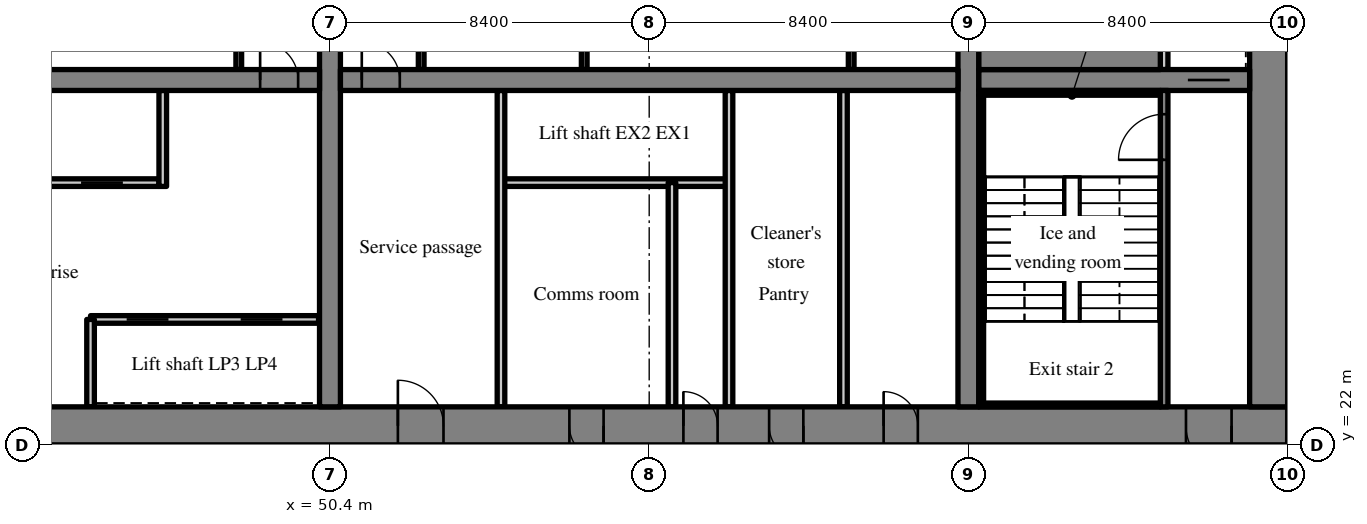
"""IFC4 building model, lengths in metres.
Left out: names, types, materials, properties, quantities, classifications, styles, units other than length and angle.
Written with IfcOpenShell. Run it as: python <this file> out.ifc"""

import sys

from ifc_helpers import new_model, si_unit, direction, frame, frame_2d, origin, place, context, subcontext, project, spatial, rectangle, extrude, source, transform, mapped, element, fill, save


model = new_model("IFC4")
c1 = context("Model", 3, precision=1e-05, world=origin(), true_north=direction((0.0, 1.0)))
c2 = subcontext(c1, "Body", "Model", "MODEL_VIEW")
j1 = project(units=[si_unit("LENGTHUNIT", "METRE"), si_unit("PLANEANGLEUNIT", "RADIAN")], contexts=[c1])
p1 = place(None, origin())
s1 = spatial("IfcSite", under=j1, at=p1, CompositionType="ELEMENT")
p2 = place(p1, origin())
s2 = spatial("IfcBuilding", under=s1, at=p2, CompositionType="ELEMENT")
p3 = place(p2, frame((0.0, 0.0, 62.0)))
s3 = spatial("IfcBuildingStorey", under=s2, at=p3, CompositionType="ELEMENT", Elevation=62.0)
m1 = source(origin(), c2, "Body", "SweptSolid", [
    extrude(rectangle(XDim=50.4, YDim=1.0, at=frame_2d((25.2, 0.0))), origin(), (0.0, 0.0, 1.0), 3.52),
])
p4 = place(p3, frame((25.2, 22.5, 0.0), z_axis=(0.0, 0.0, 1.0), x_axis=(1.0, 0.0, 0.0)))
e1 = element("IfcWall", 1, at=p4, inside=s3, PredefinedType="SHEAR", context=c2, shape_type="MappedRepresentation", body=[
    mapped(m1, transform((0.0, 0.0, 0.0), scale=1.0)),
])
m2 = source(origin(), c2, "Body", "SweptSolid", [
    extrude(rectangle(XDim=1.8, YDim=2.1, at=frame_2d((0.9, 1.05))), frame((0.0, 0.51, 0.0), z_axis=(0.0, -1.0, 0.0), x_axis=(1.0, 0.0, 0.0)), (0.0, 0.0, 1.0), 1.02),
])
p5 = place(p4, frame((15.9, 0.0, 0.0)))
e2 = element("IfcOpeningElement", 2, at=p5, cuts=e1, PredefinedType="OPENING", context=c2, shape_type="MappedRepresentation", body=[
    mapped(m2, transform((0.0, 0.0, 0.0), scale=1.0)),
])
m3 = source(origin(), c2, "Body", "SweptSolid", [
    extrude(rectangle(XDim=1.2, YDim=2.1, at=frame_2d((0.6, 1.05))), frame((0.0, 0.51, 0.0), z_axis=(0.0, -1.0, 0.0), x_axis=(1.0, 0.0, 0.0)), (0.0, 0.0, 1.0), 1.02),
])
p6 = place(p4, frame((26.987, 0.0, 0.0)))
e3 = element("IfcOpeningElement", 3, at=p6, cuts=e1, PredefinedType="OPENING", context=c2, shape_type="MappedRepresentation", body=[
    mapped(m3, transform((0.0, 0.0, 0.0), scale=1.0)),
])
m4 = source(origin(), c2, "Body", "SweptSolid", [
    extrude(rectangle(XDim=0.9, YDim=2.1, at=frame_2d((0.45, 1.05))), frame((0.0, 0.51, 0.0), z_axis=(0.0, -1.0, 0.0), x_axis=(1.0, 0.0, 0.0)), (0.0, 0.0, 1.0), 1.02),
])
p7 = place(p4, frame((34.5, 0.0, 0.0)))
e4 = element("IfcOpeningElement", 4, at=p7, cuts=e1, PredefinedType="OPENING", context=c2, shape_type="MappedRepresentation", body=[
    mapped(m4, transform((0.0, 0.0, 0.0), scale=1.0)),
])
p8 = place(p4, frame((31.5, 0.0, 0.0)))
e5 = element("IfcOpeningElement", 5, at=p8, cuts=e1, PredefinedType="OPENING", context=c2, shape_type="MappedRepresentation", body=[
    mapped(m4, transform((0.0, 0.0, 0.0), scale=1.0)),
])
p9 = place(p4, frame((39.769, 0.0, 0.0)))
e6 = element("IfcOpeningElement", 6, at=p9, cuts=e1, PredefinedType="OPENING", context=c2, shape_type="MappedRepresentation", body=[
    mapped(m4, transform((0.0, 0.0, 0.0), scale=1.0)),
])
p10 = place(p4, frame((36.756, 0.0, 0.0)))
e7 = element("IfcOpeningElement", 7, at=p10, cuts=e1, PredefinedType="OPENING", context=c2, shape_type="MappedRepresentation", body=[
    mapped(m4, transform((0.0, 0.0, 0.0), scale=1.0)),
])
p11 = place(p4, frame((6.438, 0.0, 0.0)))
e8 = element("IfcOpeningElement", 8, at=p11, cuts=e1, PredefinedType="OPENING", context=c2, shape_type="MappedRepresentation", body=[
    mapped(m3, transform((0.0, 0.0, 0.0), scale=1.0)),
])
p12 = place(p4, frame((47.725, 0.0, 0.0)))
e9 = element("IfcOpeningElement", 9, at=p12, cuts=e1, PredefinedType="OPENING", context=c2, shape_type="MappedRepresentation", body=[
    mapped(m3, transform((0.0, 0.0, 0.0), scale=1.0)),
])
m5 = source(origin(), c2, "Body", "SweptSolid", [
    extrude(rectangle(XDim=18.0, YDim=1.0, at=frame_2d((9.0, 0.0))), origin(), (0.0, 0.0, 1.0), 3.52),
])
p13 = place(p3, frame((75.1, 23.0, 0.0), z_axis=(0.0, 0.0, 1.0), x_axis=(0.0, 1.0, 0.0)))
e10 = element("IfcWall", 10, at=p13, inside=s3, PredefinedType="SHEAR", context=c2, shape_type="MappedRepresentation", body=[
    mapped(m5, transform((0.0, 0.0, 0.0), scale=1.0)),
])
p14 = place(p13, frame((12.4, 0.0, 0.0)))
e11 = element("IfcOpeningElement", 11, at=p14, cuts=e10, PredefinedType="OPENING", context=c2, shape_type="MappedRepresentation", body=[
    mapped(m3, transform((0.0, 0.0, 0.0), scale=1.0)),
])
m6 = source(origin(), c2, "Body", "SweptSolid", [
    extrude(rectangle(XDim=18.0, YDim=0.55, at=frame_2d((9.0, 0.0))), origin(), (0.0, 0.0, 1.0), 3.52),
])
p15 = place(p3, frame((50.4, 23.0, 0.0), z_axis=(0.0, 0.0, 1.0), x_axis=(0.0, 1.0, 0.0)))
e12 = element("IfcWall", 12, at=p15, inside=s3, PredefinedType="SHEAR", context=c2, shape_type="MappedRepresentation", body=[
    mapped(m6, transform((0.0, 0.0, 0.0), scale=1.0)),
])
m7 = source(origin(), c2, "Body", "SweptSolid", [
    extrude(rectangle(XDim=1.1, YDim=2.1, at=frame_2d((0.55, 1.05))), frame((0.0, 0.285, 0.0), z_axis=(0.0, -1.0, 0.0), x_axis=(1.0, 0.0, 0.0)), (0.0, 0.0, 1.0), 0.57),
])
p16 = place(p15, frame((12.45, 0.0, 0.0)))
e13 = element("IfcOpeningElement", 13, at=p16, cuts=e12, PredefinedType="OPENING", context=c2, shape_type="MappedRepresentation", body=[
    mapped(m7, transform((0.0, 0.0, 0.0), scale=1.0)),
])
p17 = place(p3, frame((67.2, 23.0, 0.0), z_axis=(0.0, 0.0, 1.0), x_axis=(0.0, 1.0, 0.0)))
e14 = element("IfcWall", 14, at=p17, inside=s3, PredefinedType="SHEAR", context=c2, shape_type="MappedRepresentation", body=[
    mapped(m6, transform((0.0, 0.0, 0.0), scale=1.0)),
])
m8 = source(origin(), c2, "Body", "SweptSolid", [
    extrude(rectangle(XDim=16.25, YDim=0.55, at=frame_2d((8.125, 0.0))), origin(), (0.0, 0.0, 1.0), 3.52),
])
p18 = place(p3, frame((33.875, 31.6, 0.0), z_axis=(0.0, 0.0, 1.0), x_axis=(1.0, 0.0, 0.0)))
e15 = element("IfcWall", 15, at=p18, inside=s3, PredefinedType="SHEAR", context=c2, shape_type="MappedRepresentation", body=[
    mapped(m8, transform((0.0, 0.0, 0.0), scale=1.0)),
])
m9 = source(origin(), c2, "Body", "SweptSolid", [
    extrude(rectangle(XDim=1.0, YDim=2.1, at=frame_2d((0.5, 1.05))), frame((0.0, 0.285, 0.0), z_axis=(0.0, -1.0, 0.0), x_axis=(1.0, 0.0, 0.0)), (0.0, 0.0, 1.0), 0.57),
])
p19 = place(p18, frame((14.687, 0.0, 0.0)))
e16 = element("IfcOpeningElement", 16, at=p19, cuts=e15, PredefinedType="OPENING", context=c2, shape_type="MappedRepresentation", body=[
    mapped(m9, transform((0.0, 0.0, 0.0), scale=1.0)),
])
p20 = place(p3, frame((50.675, 31.6, 0.0), z_axis=(0.0, 0.0, 1.0), x_axis=(1.0, 0.0, 0.0)))
e17 = element("IfcWall", 17, at=p20, inside=s3, PredefinedType="SHEAR", context=c2, shape_type="MappedRepresentation", body=[
    mapped(m8, transform((0.0, 0.0, 0.0), scale=1.0)),
])
p21 = place(p20, frame((0.562, 0.0, 0.0)))
e18 = element("IfcOpeningElement", 18, at=p21, cuts=e17, PredefinedType="OPENING", context=c2, shape_type="MappedRepresentation", body=[
    mapped(m9, transform((0.0, 0.0, 0.0), scale=1.0)),
])
m10 = source(origin(), c2, "Body", "SweptSolid", [
    extrude(rectangle(XDim=7.125, YDim=0.55, at=frame_2d((3.562, 0.0))), origin(), (0.0, 0.0, 1.0), 3.52),
])
p22 = place(p3, frame((67.475, 31.6, 0.0), z_axis=(0.0, 0.0, 1.0), x_axis=(1.0, 0.0, 0.0)))
e19 = element("IfcWall", 19, at=p22, inside=s3, PredefinedType="SHEAR", context=c2, shape_type="MappedRepresentation", body=[
    mapped(m10, transform((0.0, 0.0, 0.0), scale=1.0)),
])
p23 = place(p22, frame((5.5, 0.0, 0.0)))
e20 = element("IfcOpeningElement", 20, at=p23, cuts=e19, PredefinedType="OPENING", context=c2, shape_type="MappedRepresentation", body=[
    mapped(m7, transform((0.0, 0.0, 0.0), scale=1.0)),
])
m11 = source(origin(), c2, "Body", "SweptSolid", [
    extrude(rectangle(XDim=6.0, YDim=0.2, at=frame_2d((3.0, 0.0))), origin(), (0.0, 0.0, 1.0), 3.52),
])
p24 = place(p3, frame((44.1, 25.3, 0.0), z_axis=(0.0, 0.0, 1.0), x_axis=(1.0, 0.0, 0.0)))
e21 = element("IfcWall", 21, at=p24, inside=s3, PredefinedType="SOLIDWALL", context=c2, shape_type="MappedRepresentation", body=[
    mapped(m11, transform((0.0, 0.0, 0.0), scale=1.0)),
])
m12 = source(origin(), c2, "Body", "SweptSolid", [
    extrude(rectangle(XDim=1.1, YDim=2.1, at=frame_2d((0.55, 1.05))), frame((0.0, 0.11, 0.0), z_axis=(0.0, -1.0, 0.0), x_axis=(1.0, 0.0, 0.0)), (0.0, 0.0, 1.0), 0.22),
])
p25 = place(p24, frame((0.95, 0.0, 0.0)))
e22 = element("IfcOpeningElement", 22, at=p25, cuts=e21, PredefinedType="OPENING", context=c2, shape_type="MappedRepresentation", body=[
    mapped(m12, transform((0.0, 0.0, 0.0), scale=1.0)),
])
p26 = place(p24, frame((3.95, 0.0, 0.0)))
e23 = element("IfcOpeningElement", 23, at=p26, cuts=e21, PredefinedType="OPENING", context=c2, shape_type="MappedRepresentation", body=[
    mapped(m12, transform((0.0, 0.0, 0.0), scale=1.0)),
])
m13 = source(origin(), c2, "Body", "SweptSolid", [
    extrude(rectangle(XDim=12.025, YDim=0.2, at=frame_2d((6.012, 0.0))), origin(), (0.0, 0.0, 1.0), 3.52),
])
p27 = place(p3, frame((33.875, 28.9, 0.0), z_axis=(0.0, 0.0, 1.0), x_axis=(1.0, 0.0, 0.0)))
e24 = element("IfcWall", 24, at=p27, inside=s3, PredefinedType="SOLIDWALL", context=c2, shape_type="MappedRepresentation", body=[
    mapped(m13, transform((0.0, 0.0, 0.0), scale=1.0)),
])
p28 = place(p27, frame((0.975, 0.0, 0.0)))
e25 = element("IfcOpeningElement", 25, at=p28, cuts=e24, PredefinedType="OPENING", context=c2, shape_type="MappedRepresentation", body=[
    mapped(m12, transform((0.0, 0.0, 0.0), scale=1.0)),
])
p29 = place(p27, frame((3.975, 0.0, 0.0)))
e26 = element("IfcOpeningElement", 26, at=p29, cuts=e24, PredefinedType="OPENING", context=c2, shape_type="MappedRepresentation", body=[
    mapped(m12, transform((0.0, 0.0, 0.0), scale=1.0)),
])
p30 = place(p27, frame((6.975, 0.0, 0.0)))
e27 = element("IfcOpeningElement", 27, at=p30, cuts=e24, PredefinedType="OPENING", context=c2, shape_type="MappedRepresentation", body=[
    mapped(m12, transform((0.0, 0.0, 0.0), scale=1.0)),
])
p31 = place(p27, frame((9.975, 0.0, 0.0)))
e28 = element("IfcOpeningElement", 28, at=p31, cuts=e24, PredefinedType="OPENING", context=c2, shape_type="MappedRepresentation", body=[
    mapped(m12, transform((0.0, 0.0, 0.0), scale=1.0)),
])
m14 = source(origin(), c2, "Body", "SweptSolid", [
    extrude(rectangle(XDim=2.3, YDim=0.2, at=frame_2d((1.15, 0.0))), origin(), (0.0, 0.0, 1.0), 3.52),
])
p32 = place(p3, frame((44.1, 23.0, 0.0), z_axis=(0.0, 0.0, 1.0), x_axis=(0.0, 1.0, 0.0)))
e29 = element("IfcWall", 29, at=p32, inside=s3, PredefinedType="SOLIDWALL", context=c2, shape_type="MappedRepresentation", body=[
    mapped(m14, transform((0.0, 0.0, 0.0), scale=1.0)),
])
m15 = source(origin(), c2, "Body", "SweptSolid", [
    extrude(rectangle(XDim=2.525, YDim=0.2, at=frame_2d((1.262, 0.0))), origin(), (0.0, 0.0, 1.0), 3.52),
])
p33 = place(p3, frame((46.0, 28.8, 0.0), z_axis=(0.0, 0.0, 1.0), x_axis=(0.0, 1.0, 0.0)))
e30 = element("IfcWall", 30, at=p33, inside=s3, PredefinedType="SOLIDWALL", context=c2, shape_type="MappedRepresentation", body=[
    mapped(m15, transform((0.0, 0.0, 0.0), scale=1.0)),
])
m16 = source(origin(), c2, "Body", "SweptSolid", [
    extrude(rectangle(XDim=3.125, YDim=0.15, at=frame_2d((1.562, 0.0))), origin(), (0.0, 0.0, 1.0), 3.52),
])
p34 = place(p3, frame((48.0, 31.875, 0.0), z_axis=(0.0, 0.0, 1.0), x_axis=(0.0, 1.0, 0.0)))
e31 = element("IfcWall", 31, at=p34, inside=s3, PredefinedType="PARTITIONING", context=c2, shape_type="MappedRepresentation", body=[
    mapped(m16, transform((0.0, 0.0, 0.0), scale=1.0)),
])
p35 = place(p3, frame((60.9, 28.9, 0.0), z_axis=(0.0, 0.0, 1.0), x_axis=(-1.0, 0.0, 0.0)))
e32 = element("IfcWall", 32, at=p35, inside=s3, PredefinedType="SOLIDWALL", context=c2, shape_type="MappedRepresentation", body=[
    mapped(m11, transform((0.0, 0.0, 0.0), scale=1.0)),
])
m17 = source(origin(), c2, "Body", "SweptSolid", [
    extrude(rectangle(XDim=8.325, YDim=0.2, at=frame_2d((4.163, 0.0))), origin(), (0.0, 0.0, 1.0), 3.52),
])
for number, where, z_axis, x_axis in (
    (33, (54.9, 23.0, 0.0), (0.0, 0.0, 1.0), (0.0, 1.0, 0.0)),
    (34, (60.9, 23.0, 0.0), (0.0, 0.0, 1.0), (0.0, 1.0, 0.0)),
):
    element("IfcWall", number, at=place(p3, frame(where, z_axis=z_axis, x_axis=x_axis)), inside=s3, PredefinedType="PARTITIONING", context=c2, shape_type="MappedRepresentation", body=[
        mapped(m17, transform((0.0, 0.0, 0.0), scale=1.0)),
    ])
m18 = source(origin(), c2, "Body", "SweptSolid", [
    extrude(rectangle(XDim=5.9, YDim=0.2, at=frame_2d((2.95, 0.0))), origin(), (0.0, 0.0, 1.0), 3.52),
])
p36 = place(p3, frame((59.4, 23.0, 0.0), z_axis=(0.0, 0.0, 1.0), x_axis=(0.0, 1.0, 0.0)))
e35 = element("IfcWall", 35, at=p36, inside=s3, PredefinedType="PARTITIONING", context=c2, shape_type="MappedRepresentation", body=[
    mapped(m18, transform((0.0, 0.0, 0.0), scale=1.0)),
])
p37 = place(p3, frame((63.912, 23.0, 0.0), z_axis=(0.0, 0.0, 1.0), x_axis=(0.0, 1.0, 0.0)))
e36 = element("IfcWall", 36, at=p37, inside=s3, PredefinedType="PARTITIONING", context=c2, shape_type="MappedRepresentation", body=[
    mapped(m17, transform((0.0, 0.0, 0.0), scale=1.0)),
])
for number, where, z_axis, x_axis in (
    (37, (52.8, 31.875, 0.0), (0.0, 0.0, 1.0), (0.0, 1.0, 0.0)),
    (38, (64.115, 31.875, 0.0), (0.0, 0.0, 1.0), (0.0, 1.0, 0.0)),
    (39, (57.09, 31.875, 0.0), (0.0, 0.0, 1.0), (0.0, 1.0, 0.0)),
):
    element("IfcWall", number, at=place(p3, frame(where, z_axis=z_axis, x_axis=x_axis)), inside=s3, PredefinedType="PARTITIONING", context=c2, shape_type="MappedRepresentation", body=[
        mapped(m16, transform((0.0, 0.0, 0.0), scale=1.0)),
    ])
m19 = source(origin(), c2, "Body", "SweptSolid", [
    extrude(rectangle(XDim=8.325, YDim=0.2, at=frame_2d((4.163, 0.0))), origin(), (0.0, 0.0, 1.0), 3.52),
])
p38 = place(p3, frame((72.35, 23.0, 0.0), z_axis=(0.0, 0.0, 1.0), x_axis=(0.0, 1.0, 0.0)))
e40 = element("IfcWall", 40, at=p38, inside=s3, PredefinedType="SOLIDWALL", context=c2, shape_type="MappedRepresentation", body=[
    mapped(m19, transform((0.0, 0.0, 0.0), scale=1.0)),
])
m20 = source(origin(), c2, "Body", "SweptSolid", [
    extrude(rectangle(XDim=1.2, YDim=2.1, at=frame_2d((0.6, 1.05))), frame((0.0, 0.11, 0.0), z_axis=(0.0, -1.0, 0.0), x_axis=(1.0, 0.0, 0.0)), (0.0, 0.0, 1.0), 0.22),
])
p39 = place(p38, frame((6.5, 0.0, 0.0)))
e41 = element("IfcOpeningElement", 41, at=p39, cuts=e40, PredefinedType="OPENING", context=c2, shape_type="MappedRepresentation", body=[
    mapped(m20, transform((0.0, 0.0, 0.0), scale=1.0)),
])
m21 = source(origin(), c2, "Body", "SweptSolid", [
    extrude(rectangle(XDim=1.725, YDim=0.2, at=frame_2d((0.863, 0.0))), origin(), (0.0, 0.0, 1.0), 3.52),
])
p40 = place(p3, frame((72.35, 31.875, 0.0), z_axis=(0.0, 0.0, 1.0), x_axis=(0.0, 1.0, 0.0)))
e42 = element("IfcWall", 42, at=p40, inside=s3, PredefinedType="SOLIDWALL", context=c2, shape_type="MappedRepresentation", body=[
    mapped(m21, transform((0.0, 0.0, 0.0), scale=1.0)),
])
m22 = source(origin(), c2, "Body", "SweptSolid", [
    extrude(rectangle(XDim=8.2, YDim=0.2, at=frame_2d((4.1, 0.0))), origin(), (0.0, 0.0, 1.0), 3.52),
])
p41 = place(p3, frame((83.8, 22.1, 0.0), z_axis=(0.0, 0.0, 1.0), x_axis=(-1.0, 0.0, 0.0)))
e43 = element("IfcWall", 43, at=p41, inside=s3, PredefinedType="SOLIDWALL", context=c2, shape_type="MappedRepresentation", body=[
    mapped(m22, transform((0.0, 0.0, 0.0), scale=1.0)),
])
p42 = place(p41, frame((6.0, 0.0, 0.0)))
e44 = element("IfcOpeningElement", 44, at=p42, cuts=e43, PredefinedType="OPENING", context=c2, shape_type="MappedRepresentation", body=[
    mapped(m20, transform((0.0, 0.0, 0.0), scale=1.0)),
])
p43 = place(p3, frame((83.8, 30.4, 0.0), z_axis=(0.0, 0.0, 1.0), x_axis=(-1.0, 0.0, 0.0)))
e45 = element("IfcWall", 45, at=p43, inside=s3, PredefinedType="SOLIDWALL", context=c2, shape_type="MappedRepresentation", body=[
    mapped(m22, transform((0.0, 0.0, 0.0), scale=1.0)),
])
m23 = source(origin(), c2, "Body", "SweptSolid", [
    extrude(rectangle(XDim=1.0, YDim=2.1, at=frame_2d((0.5, 1.05))), frame((0.0, 0.11, 0.0), z_axis=(0.0, -1.0, 0.0), x_axis=(1.0, 0.0, 0.0)), (0.0, 0.0, 1.0), 0.22),
])
p44 = place(p43, frame((6.1, 0.0, 0.0)))
e46 = element("IfcOpeningElement", 46, at=p44, cuts=e45, PredefinedType="OPENING", context=c2, shape_type="MappedRepresentation", body=[
    mapped(m23, transform((0.0, 0.0, 0.0), scale=1.0)),
])
m24 = source(origin(), c2, "Body", "SweptSolid", [
    extrude(rectangle(XDim=4.775, YDim=0.1, at=frame_2d((2.387, 0.0))), origin(), (0.0, 0.0, 1.0), 3.52),
])
p45 = place(p3, frame((67.475, 23.05, 0.0), z_axis=(0.0, 0.0, 1.0), x_axis=(1.0, 0.0, 0.0)))
e47 = element("IfcWall", 47, at=p45, inside=s3, PredefinedType="SOLIDWALL", context=c2, shape_type="MappedRepresentation", body=[
    mapped(m24, transform((0.0, 0.0, 0.0), scale=1.0)),
])
m25 = source(origin(), c2, "Body", "SweptSolid", [
    extrude(rectangle(XDim=4.775, YDim=0.125, at=frame_2d((2.387, 0.0))), origin(), (0.0, 0.0, 1.0), 3.52),
])
p46 = place(p3, frame((67.475, 31.262, 0.0), z_axis=(0.0, 0.0, 1.0), x_axis=(1.0, 0.0, 0.0)))
e48 = element("IfcWall", 48, at=p46, inside=s3, PredefinedType="SOLIDWALL", context=c2, shape_type="MappedRepresentation", body=[
    mapped(m25, transform((0.0, 0.0, 0.0), scale=1.0)),
])
m26 = source(origin(), c2, "Body", "SweptSolid", [
    extrude(rectangle(XDim=8.1, YDim=0.125, at=frame_2d((4.05, 0.0))), origin(), (0.0, 0.0, 1.0), 3.52),
])
p47 = place(p3, frame((67.537, 23.1, 0.0), z_axis=(0.0, 0.0, 1.0), x_axis=(0.0, 1.0, 0.0)))
e49 = element("IfcWall", 49, at=p47, inside=s3, PredefinedType="SOLIDWALL", context=c2, shape_type="MappedRepresentation", body=[
    mapped(m26, transform((0.0, 0.0, 0.0), scale=1.0)),
])
m27 = source(origin(), c2, "Body", "SweptSolid", [
    extrude(rectangle(XDim=4.775, YDim=0.925, at=frame_2d((2.387, 0.0))), origin(), (0.0, 0.0, 1.0), 3.52),
])
p48 = place(p3, frame((67.475, 32.337, 0.0), z_axis=(0.0, 0.0, 1.0), x_axis=(1.0, 0.0, 0.0)))
e50 = element("IfcWall", 50, at=p48, inside=s3, PredefinedType="SOLIDWALL", context=c2, shape_type="MappedRepresentation", body=[
    mapped(m27, transform((0.0, 0.0, 0.0), scale=1.0)),
])
m28 = source(origin(), c2, "Body", "SweptSolid", [
    extrude(rectangle(XDim=1.0, YDim=2.1, at=frame_2d((0.5, 1.05))), frame((0.0, 0.025, 0.0), z_axis=(0.0, -1.0, 0.0), x_axis=(1.0, 0.0, 0.0)), (0.0, 0.0, 1.0), 0.05),
])
p49 = place(p19, origin())
e51 = element("IfcDoor", 51, at=p49, inside=s3, OperationType="SINGLE_SWING_LEFT", PredefinedType="DOOR", context=c2, shape_type="MappedRepresentation", body=[
    mapped(m28, transform((0.0, 0.0, 0.0), scale=1.0)),
])
fill(e16, e51)
m29 = source(origin(), c2, "Body", "SweptSolid", [
    extrude(rectangle(XDim=1.1, YDim=2.1, at=frame_2d((0.55, 1.05))), frame((0.0, 0.025, 0.0), z_axis=(0.0, -1.0, 0.0), x_axis=(1.0, 0.0, 0.0)), (0.0, 0.0, 1.0), 0.05),
])
p50 = place(p25, origin())
e52 = element("IfcDoor", 52, at=p50, inside=s3, OperationType="SLIDING_TO_LEFT", PredefinedType="DOOR", context=c2, shape_type="MappedRepresentation", body=[
    mapped(m29, transform((0.0, 0.0, 0.0), scale=1.0)),
])
fill(e22, e52)
p51 = place(p26, origin())
e53 = element("IfcDoor", 53, at=p51, inside=s3, OperationType="SLIDING_TO_RIGHT", PredefinedType="DOOR", context=c2, shape_type="MappedRepresentation", body=[
    mapped(m29, transform((0.0, 0.0, 0.0), scale=1.0)),
])
fill(e23, e53)
p52 = place(p31, origin())
e54 = element("IfcDoor", 54, at=p52, inside=s3, OperationType="SLIDING_TO_RIGHT", PredefinedType="DOOR", context=c2, shape_type="MappedRepresentation", body=[
    mapped(m29, transform((0.0, 0.0, 0.0), scale=1.0)),
])
fill(e28, e54)
m30 = source(origin(), c2, "Body", "SweptSolid", [
    extrude(rectangle(XDim=1.2, YDim=2.1, at=frame_2d((0.6, 1.05))), frame((0.0, 0.375, 0.0), z_axis=(0.0, -1.0, 0.0), x_axis=(1.0, 0.0, 0.0)), (0.0, 0.0, 1.0), 0.05),
])
p53 = place(p6, origin())
e55 = element("IfcDoor", 55, at=p53, inside=s3, OperationType="SINGLE_SWING_LEFT", PredefinedType="DOOR", context=c2, shape_type="MappedRepresentation", body=[
    mapped(m30, transform((0.0, 0.0, 0.0), scale=1.0)),
])
fill(e3, e55)
p54 = place(p21, origin())
e56 = element("IfcDoor", 56, at=p54, inside=s3, OperationType="SINGLE_SWING_LEFT", PredefinedType="DOOR", context=c2, shape_type="MappedRepresentation", body=[
    mapped(m28, transform((0.0, 0.0, 0.0), scale=1.0)),
])
fill(e18, e56)
m31 = source(origin(), c2, "Body", "SweptSolid", [
    extrude(rectangle(XDim=0.9, YDim=2.1, at=frame_2d((0.45, 1.05))), frame((0.0, 0.375, 0.0), z_axis=(0.0, -1.0, 0.0), x_axis=(1.0, 0.0, 0.0)), (0.0, 0.0, 1.0), 0.05),
])
p55 = place(p7, origin())
e57 = element("IfcDoor", 57, at=p55, inside=s3, OperationType="SINGLE_SWING_LEFT", PredefinedType="DOOR", context=c2, shape_type="MappedRepresentation", body=[
    mapped(m31, transform((0.0, 0.0, 0.0), scale=1.0)),
])
fill(e4, e57)
p56 = place(p8, origin())
e58 = element("IfcDoor", 58, at=p56, inside=s3, OperationType="SINGLE_SWING_RIGHT", PredefinedType="DOOR", context=c2, shape_type="MappedRepresentation", body=[
    mapped(m31, transform((0.0, 0.0, 0.0), scale=1.0)),
])
fill(e5, e58)
p57 = place(p9, origin())
e59 = element("IfcDoor", 59, at=p57, inside=s3, OperationType="SINGLE_SWING_LEFT", PredefinedType="DOOR", context=c2, shape_type="MappedRepresentation", body=[
    mapped(m31, transform((0.0, 0.0, 0.0), scale=1.0)),
])
fill(e6, e59)
p58 = place(p10, origin())
e60 = element("IfcDoor", 60, at=p58, inside=s3, OperationType="SINGLE_SWING_RIGHT", PredefinedType="DOOR", context=c2, shape_type="MappedRepresentation", body=[
    mapped(m31, transform((0.0, 0.0, 0.0), scale=1.0)),
])
fill(e7, e60)
m32 = source(origin(), c2, "Body", "SweptSolid", [
    extrude(rectangle(XDim=1.2, YDim=2.1, at=frame_2d((0.6, 1.05))), frame((0.0, 0.025, 0.0), z_axis=(0.0, -1.0, 0.0), x_axis=(1.0, 0.0, 0.0)), (0.0, 0.0, 1.0), 0.05),
])
p59 = place(p39, origin())
e61 = element("IfcDoor", 61, at=p59, inside=s3, OperationType="SINGLE_SWING_LEFT", PredefinedType="DOOR", context=c2, shape_type="MappedRepresentation", body=[
    mapped(m32, transform((0.0, 0.0, 0.0), scale=1.0)),
])
fill(e41, e61)
p60 = place(p12, origin())
e62 = element("IfcDoor", 62, at=p60, inside=s3, OperationType="SINGLE_SWING_RIGHT", PredefinedType="DOOR", context=c2, shape_type="MappedRepresentation", body=[
    mapped(m30, transform((0.0, 0.0, 0.0), scale=1.0)),
])
fill(e9, e62)
p61 = place(p23, origin())
e63 = element("IfcDoor", 63, at=p61, inside=s3, OperationType="SLIDING_TO_RIGHT", PredefinedType="DOOR", context=c2, shape_type="MappedRepresentation", body=[
    mapped(m29, transform((0.0, 0.0, 0.0), scale=1.0)),
])
fill(e20, e63)
save(model, sys.argv[1])
